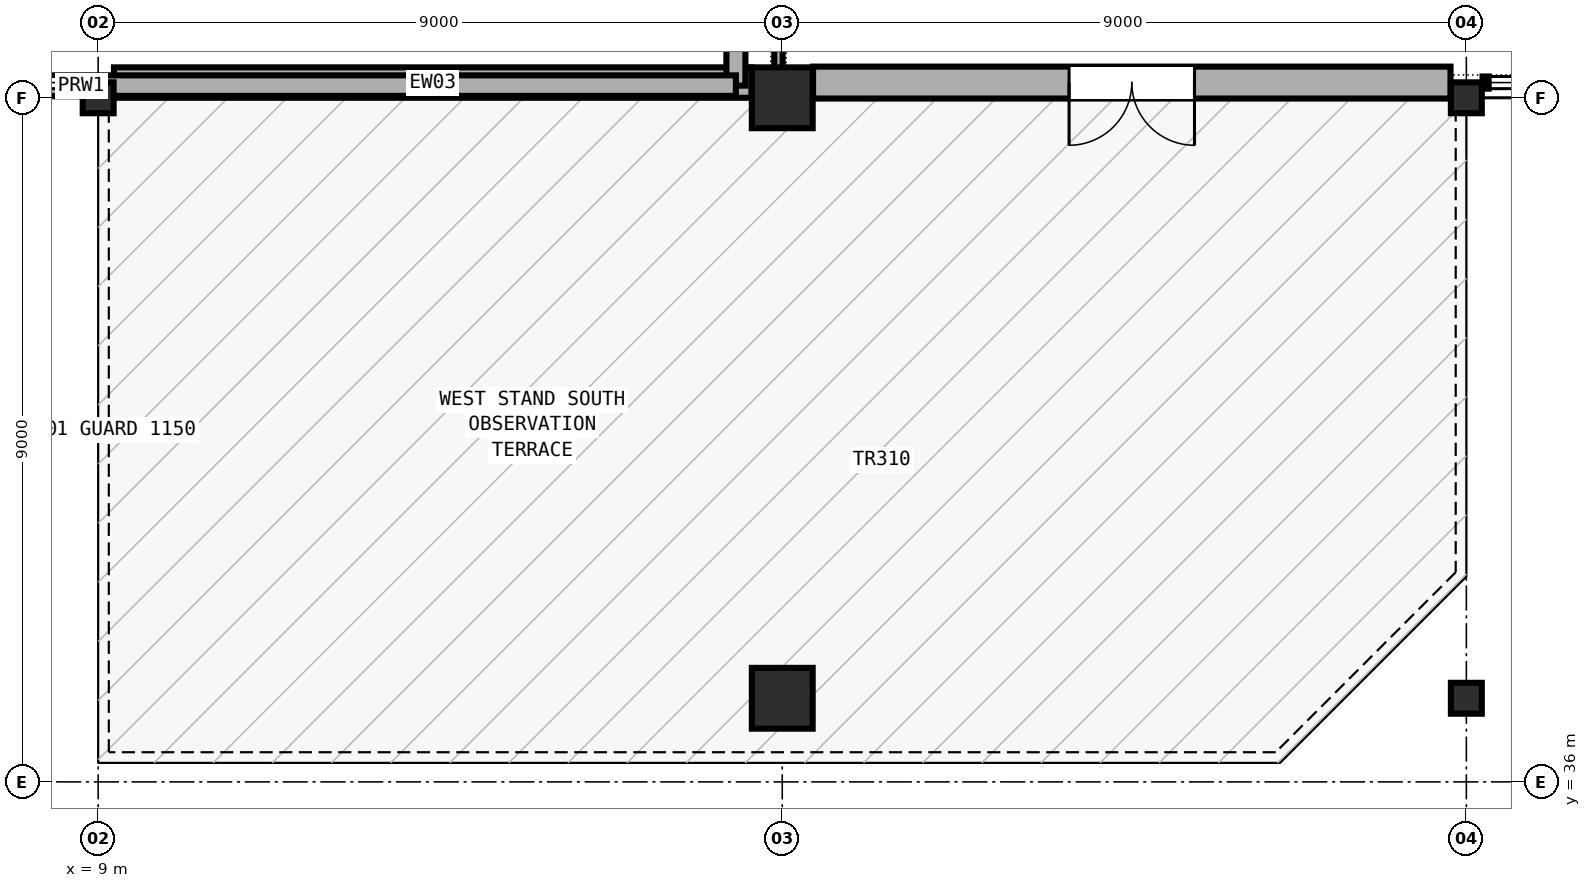
"""IFC4 building model, lengths in metres.
Left out: names, types, materials, properties, quantities, classifications, styles, units other than length and angle.
Written with IfcOpenShell. Run it as: python <this file> out.ifc"""

import sys

from ifc_helpers import new_model, si_unit, direction, frame, frame_2d, origin, origin_2d, place, context, subcontext, project, spatial, rectangle, hollow_circle, extrude, element, fill, save


model = new_model("IFC4")
c1 = context("Model", 3, precision=1e-05, world=origin(), true_north=direction((0.0, 1.0)))
c2 = subcontext(c1, "Body", "Model", "MODEL_VIEW")
j1 = project(units=[si_unit("LENGTHUNIT", "METRE"), si_unit("PLANEANGLEUNIT", "RADIAN")], contexts=[c1])
p1 = place(None, origin())
s1 = spatial("IfcSite", under=j1, at=p1, CompositionType="ELEMENT")
p2 = place(p1, origin())
s2 = spatial("IfcBuilding", under=s1, at=p2, CompositionType="ELEMENT")
p3 = place(p2, frame((0.0, 0.0, 24.0)))
s3 = spatial("IfcBuildingStorey", under=s2, at=p3, CompositionType="ELEMENT", Elevation=24.0)
p4 = place(p3, frame((9.0, 45.0, 0.0), z_axis=(0.0, 0.0, 1.0), x_axis=(1.0, 0.0, 0.0)))
e1 = element("IfcColumn", 1, at=p4, inside=s3, PredefinedType="COLUMN", context=c2, shape_type="SweptSolid", body=[
    extrude(hollow_circle(Radius=0.203, WallThickness=0.014, at=origin_2d()), origin(), (0.0, 0.0, 1.0), 4.8),
])
for number, where, z_axis, x_axis in (
    (2, (18.0, 37.1, 0.0), (0.0, 0.0, 1.0), (1.0, 0.0, 0.0)),
    (3, (18.0, 45.0, 0.0), (0.0, 0.0, 1.0), (1.0, 0.0, 0.0)),
):
    element("IfcColumn", number, at=place(p3, frame(where, z_axis=z_axis, x_axis=x_axis)), inside=s3, PredefinedType="COLUMN", context=c2, shape_type="SweptSolid", body=[
        extrude(rectangle(XDim=0.8, YDim=0.8, at=origin_2d()), origin(), (0.0, 0.0, 1.0), 4.8),
    ])
for number, where, z_axis, x_axis in (
    (4, (27.0, 37.1, 0.0), (0.0, 0.0, 1.0), (1.0, 0.0, 0.0)),
    (5, (27.0, 45.0, 0.0), (0.0, 0.0, 1.0), (1.0, 0.0, 0.0)),
):
    element("IfcColumn", number, at=place(p3, frame(where, z_axis=z_axis, x_axis=x_axis)), inside=s3, PredefinedType="COLUMN", context=c2, shape_type="SweptSolid", body=[
        extrude(hollow_circle(Radius=0.203, WallThickness=0.014, at=origin_2d()), origin(), (0.0, 0.0, 1.0), 4.8),
    ])
p5 = place(p3, frame((26.792, 45.2, 0.0), z_axis=(0.0, 0.0, 1.0), x_axis=(-1.0, 0.0, 0.0)))
e6 = element("IfcWall", 6, at=p5, inside=s3, PredefinedType="SOLIDWALL", context=c2, shape_type="SweptSolid", body=[
    extrude(rectangle(XDim=8.387, YDim=0.42, at=frame_2d((4.193, 0.0))), origin(), (0.0, 0.0, 1.0), 3.58),
])
p6 = place(p5, frame((3.368, 0.0, 0.0)))
e7 = element("IfcOpeningElement", 7, at=p6, cuts=e6, PredefinedType="OPENING", context=c2, shape_type="SweptSolid", body=[
    extrude(rectangle(XDim=1.65, YDim=2.2, at=frame_2d((0.825, 1.1))), frame((0.0, 0.22, 0.0), z_axis=(0.0, -1.0, 0.0), x_axis=(1.0, 0.0, 0.0)), (0.0, 0.0, 1.0), 0.44),
])
p7 = place(p3, frame((17.595, 45.2, 0.0), z_axis=(0.0, 0.0, 1.0), x_axis=(-1.0, 0.0, 0.0)))
e8 = element("IfcWall", 8, at=p7, inside=s3, PredefinedType="SOLIDWALL", context=c2, shape_type="SweptSolid", body=[
    extrude(rectangle(XDim=8.387, YDim=0.4, at=frame_2d((4.193, 0.0))), origin(), (0.0, 0.0, 1.0), 3.58),
])
p8 = place(p3, frame((17.39, 116.84, 4.8), z_axis=(0.0, 0.0, 1.0), x_axis=(0.0, -1.0, 0.0)))
e9 = element("IfcWall", 9, at=p8, inside=s3, PredefinedType="PARAPET", context=c2, shape_type="SweptSolid", body=[
    extrude(rectangle(XDim=71.68, YDim=0.25, at=frame_2d((35.84, 0.0))), origin(), (0.0, 0.0, 1.0), 0.65),
])
p9 = place(p3, frame((17.39, 45.16, 4.8), z_axis=(0.0, 0.0, 1.0), x_axis=(-1.0, 0.0, 0.0)))
e10 = element("IfcWall", 10, at=p9, inside=s3, PredefinedType="PARAPET", context=c2, shape_type="SweptSolid", body=[
    extrude(rectangle(XDim=17.23, YDim=0.27, at=frame_2d((8.615, 0.0))), origin(), (0.0, 0.0, 1.0), 0.65),
])
p10 = place(p3, frame((17.95, 53.198, 0.0), z_axis=(0.0, 0.0, 1.0), x_axis=(0.0, -1.0, 0.0)))
e11 = element("IfcWall", 11, at=p10, inside=s3, PredefinedType="PARTITIONING", context=c2, shape_type="SweptSolid", body=[
    extrude(rectangle(XDim=7.958, YDim=0.11, at=frame_2d((3.979, 0.0))), origin(), (0.0, 0.0, 1.0), 3.56),
])
p11 = place(p6, origin())
e12 = element("IfcDoor", 12, at=p11, inside=s3, OperationType="DOUBLE_DOOR_SINGLE_SWING", PredefinedType="DOOR", context=c2, shape_type="SweptSolid", body=[
    extrude(rectangle(XDim=1.65, YDim=2.2, at=frame_2d((0.825, 1.1))), frame((0.0, 0.025, 0.0), z_axis=(0.0, -1.0, 0.0), x_axis=(1.0, 0.0, 0.0)), (0.0, 0.0, 1.0), 0.05),
])
fill(e7, e12)
save(model, sys.argv[1])
